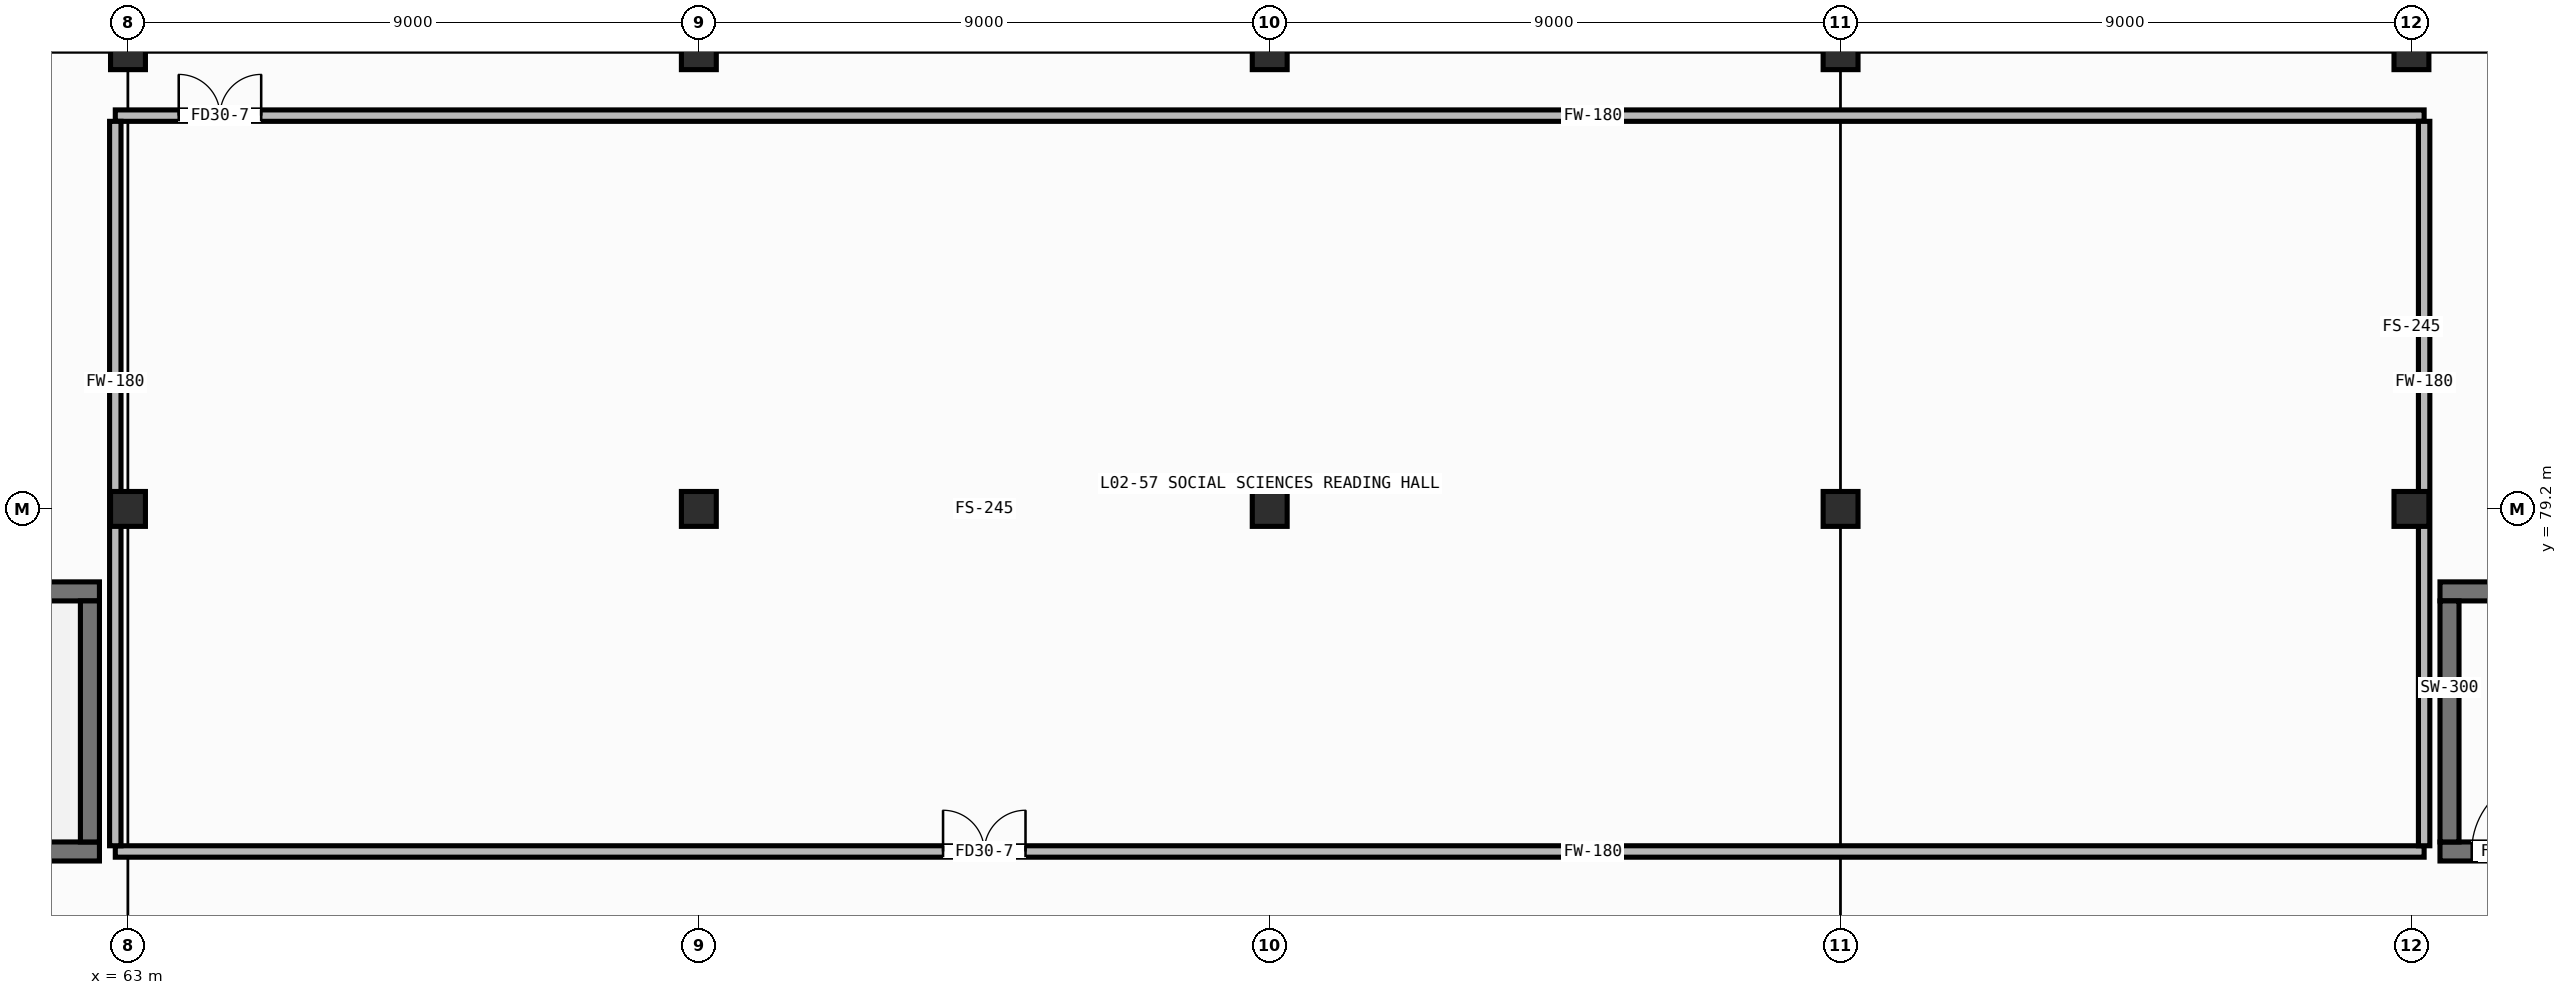
"""IFC4 building model, lengths in metres.
Left out: names, types, materials, properties, quantities, classifications, styles, units other than length and angle.
Written with IfcOpenShell. Run it as: python <this file> out.ifc"""

import sys

from ifc_helpers import new_model, si_unit, direction, frame, frame_2d, origin, origin_2d, place, context, subcontext, project, spatial, rectangle, hollow_rectangle, extrude, element, fill, save


model = new_model("IFC4")
c1 = context("Model", 3, precision=1e-05, world=origin(), true_north=direction((0.0, 1.0)))
c2 = subcontext(c1, "Body", "Model", "MODEL_VIEW")
j1 = project(units=[si_unit("LENGTHUNIT", "METRE"), si_unit("PLANEANGLEUNIT", "RADIAN")], contexts=[c1])
p1 = place(None, origin())
s1 = spatial("IfcSite", under=j1, at=p1, CompositionType="ELEMENT")
p2 = place(p1, origin())
s2 = spatial("IfcBuilding", under=s1, at=p2, CompositionType="ELEMENT")
p3 = place(p2, frame((0.0, 0.0, 4.8)))
s3 = spatial("IfcBuildingStorey", under=s2, at=p3, CompositionType="ELEMENT", Elevation=4.8)
for number, where, z_axis, x_axis in (
    (1, (63.0, 79.2, 0.0), (0.0, 0.0, 1.0), (1.0, 0.0, 0.0)),
    (2, (63.0, 86.4, 0.0), (0.0, 0.0, 1.0), (1.0, 0.0, 0.0)),
):
    element("IfcColumn", number, at=place(p3, frame(where, z_axis=z_axis, x_axis=x_axis)), inside=s3, PredefinedType="COLUMN", context=c2, shape_type="SweptSolid", body=[
        extrude(hollow_rectangle(XDim=0.55, YDim=0.55, WallThickness=0.022, at=origin_2d()), origin(), (0.0, 0.0, 1.0), 4.0),
    ])
p4 = place(p3, frame((72.0, 79.2, 0.0), z_axis=(0.0, 0.0, 1.0), x_axis=(1.0, 0.0, 0.0)))
e3 = element("IfcColumn", 3, at=p4, inside=s3, PredefinedType="COLUMN", context=c2, shape_type="SweptSolid", body=[
    extrude(hollow_rectangle(XDim=0.55, YDim=0.55, WallThickness=0.022, at=origin_2d()), origin(), (0.0, 0.0, 1.0), 3.755),
])
p5 = place(p3, frame((72.0, 86.4, 0.0), z_axis=(0.0, 0.0, 1.0), x_axis=(1.0, 0.0, 0.0)))
e4 = element("IfcColumn", 4, at=p5, inside=s3, PredefinedType="COLUMN", context=c2, shape_type="SweptSolid", body=[
    extrude(hollow_rectangle(XDim=0.55, YDim=0.55, WallThickness=0.022, at=origin_2d()), origin(), (0.0, 0.0, 1.0), 4.0),
])
p6 = place(p3, frame((81.0, 79.2, 0.0), z_axis=(0.0, 0.0, 1.0), x_axis=(1.0, 0.0, 0.0)))
e5 = element("IfcColumn", 5, at=p6, inside=s3, PredefinedType="COLUMN", context=c2, shape_type="SweptSolid", body=[
    extrude(hollow_rectangle(XDim=0.55, YDim=0.55, WallThickness=0.022, at=origin_2d()), origin(), (0.0, 0.0, 1.0), 3.755),
])
for number, where, z_axis, x_axis in (
    (6, (81.0, 86.4, 0.0), (0.0, 0.0, 1.0), (1.0, 0.0, 0.0)),
    (7, (90.0, 79.2, 0.0), (0.0, 0.0, 1.0), (1.0, 0.0, 0.0)),
    (8, (90.0, 86.4, 0.0), (0.0, 0.0, 1.0), (1.0, 0.0, 0.0)),
    (9, (99.0, 79.2, 0.0), (0.0, 0.0, 1.0), (1.0, 0.0, 0.0)),
    (10, (99.0, 86.4, 0.0), (0.0, 0.0, 1.0), (1.0, 0.0, 0.0)),
):
    element("IfcColumn", number, at=place(p3, frame(where, z_axis=z_axis, x_axis=x_axis)), inside=s3, PredefinedType="COLUMN", context=c2, shape_type="SweptSolid", body=[
        extrude(hollow_rectangle(XDim=0.55, YDim=0.55, WallThickness=0.022, at=origin_2d()), origin(), (0.0, 0.0, 1.0), 4.0),
    ])
p7 = place(p3, frame((54.45, 73.8, 0.0), z_axis=(0.0, 0.0, 1.0), x_axis=(1.0, 0.0, 0.0)))
e11 = element("IfcWall", 11, at=p7, inside=s3, PredefinedType="SHEAR", context=c2, shape_type="SweptSolid", body=[
    extrude(rectangle(XDim=8.1, YDim=0.3, at=frame_2d((4.05, 0.0))), origin(), (0.0, 0.0, 1.0), 3.755),
])
p8 = place(p7, frame((0.5, 0.0, 0.0)))
e12 = element("IfcOpeningElement", 12, at=p8, cuts=e11, PredefinedType="OPENING", context=c2, shape_type="SweptSolid", body=[
    extrude(rectangle(XDim=1.2, YDim=2.1, at=frame_2d((0.6, 1.05))), frame((0.0, 0.162, 0.0), z_axis=(0.0, -1.0, 0.0), x_axis=(1.0, 0.0, 0.0)), (0.0, 0.0, 1.0), 0.324),
])
p9 = place(p3, frame((54.45, 77.9, 0.0), z_axis=(0.0, 0.0, 1.0), x_axis=(1.0, 0.0, 0.0)))
e13 = element("IfcWall", 13, at=p9, inside=s3, PredefinedType="SHEAR", context=c2, shape_type="SweptSolid", body=[
    extrude(rectangle(XDim=8.1, YDim=0.3, at=frame_2d((4.05, 0.0))), origin(), (0.0, 0.0, 1.0), 3.755),
])
p10 = place(p3, frame((62.4, 73.95, 0.0), z_axis=(0.0, 0.0, 1.0), x_axis=(0.0, 1.0, 0.0)))
e14 = element("IfcWall", 14, at=p10, inside=s3, PredefinedType="SHEAR", context=c2, shape_type="SweptSolid", body=[
    extrude(rectangle(XDim=3.8, YDim=0.3, at=frame_2d((1.9, 0.0))), origin(), (0.0, 0.0, 1.0), 3.755),
])
p11 = place(p3, frame((99.45, 73.8, 0.0), z_axis=(0.0, 0.0, 1.0), x_axis=(1.0, 0.0, 0.0)))
e15 = element("IfcWall", 15, at=p11, inside=s3, PredefinedType="SHEAR", context=c2, shape_type="SweptSolid", body=[
    extrude(rectangle(XDim=8.1, YDim=0.3, at=frame_2d((4.05, 0.0))), origin(), (0.0, 0.0, 1.0), 3.755),
])
p12 = place(p11, frame((0.5, 0.0, 0.0)))
e16 = element("IfcOpeningElement", 16, at=p12, cuts=e15, PredefinedType="OPENING", context=c2, shape_type="SweptSolid", body=[
    extrude(rectangle(XDim=1.2, YDim=2.1, at=frame_2d((0.6, 1.05))), frame((0.0, 0.162, 0.0), z_axis=(0.0, -1.0, 0.0), x_axis=(1.0, 0.0, 0.0)), (0.0, 0.0, 1.0), 0.324),
])
p13 = place(p3, frame((99.45, 77.9, 0.0), z_axis=(0.0, 0.0, 1.0), x_axis=(1.0, 0.0, 0.0)))
e17 = element("IfcWall", 17, at=p13, inside=s3, PredefinedType="SHEAR", context=c2, shape_type="SweptSolid", body=[
    extrude(rectangle(XDim=8.1, YDim=0.3, at=frame_2d((4.05, 0.0))), origin(), (0.0, 0.0, 1.0), 3.755),
])
p14 = place(p3, frame((99.6, 73.95, 0.0), z_axis=(0.0, 0.0, 1.0), x_axis=(0.0, 1.0, 0.0)))
e18 = element("IfcWall", 18, at=p14, inside=s3, PredefinedType="SHEAR", context=c2, shape_type="SweptSolid", body=[
    extrude(rectangle(XDim=3.8, YDim=0.3, at=frame_2d((1.9, 0.0))), origin(), (0.0, 0.0, 1.0), 3.755),
])
p15 = place(p3, frame((62.8, 73.8, 0.0), z_axis=(0.0, 0.0, 1.0), x_axis=(1.0, 0.0, 0.0)))
e19 = element("IfcWall", 19, at=p15, inside=s3, PredefinedType="PARTITIONING", context=c2, shape_type="SweptSolid", body=[
    extrude(rectangle(XDim=36.4, YDim=0.18, at=frame_2d((18.2, 0.0))), origin(), (0.0, 0.0, 1.0), 3.755),
])
p16 = place(p15, frame((13.05, 0.0, 0.0)))
e20 = element("IfcOpeningElement", 20, at=p16, cuts=e19, PredefinedType="OPENING", context=c2, shape_type="SweptSolid", body=[
    extrude(rectangle(XDim=1.3, YDim=2.08, at=frame_2d((0.65, 1.04))), frame((0.0, 0.102, 0.0), z_axis=(0.0, -1.0, 0.0), x_axis=(1.0, 0.0, 0.0)), (0.0, 0.0, 1.0), 0.204),
])
p17 = place(p3, frame((62.8, 85.4, 0.0), z_axis=(0.0, 0.0, 1.0), x_axis=(1.0, 0.0, 0.0)))
e21 = element("IfcWall", 21, at=p17, inside=s3, PredefinedType="PARTITIONING", context=c2, shape_type="SweptSolid", body=[
    extrude(rectangle(XDim=36.4, YDim=0.18, at=frame_2d((18.2, 0.0))), origin(), (0.0, 0.0, 1.0), 3.755),
])
p18 = place(p17, frame((1.0, 0.0, 0.0)))
e22 = element("IfcOpeningElement", 22, at=p18, cuts=e21, PredefinedType="OPENING", context=c2, shape_type="SweptSolid", body=[
    extrude(rectangle(XDim=1.3, YDim=2.08, at=frame_2d((0.65, 1.04))), frame((0.0, 0.102, 0.0), z_axis=(0.0, -1.0, 0.0), x_axis=(1.0, 0.0, 0.0)), (0.0, 0.0, 1.0), 0.204),
])
for number, where, z_axis, x_axis in (
    (23, (62.8, 73.89, 0.0), (0.0, 0.0, 1.0), (0.0, 1.0, 0.0)),
    (24, (99.2, 73.89, 0.0), (0.0, 0.0, 1.0), (0.0, 1.0, 0.0)),
):
    element("IfcWall", number, at=place(p3, frame(where, z_axis=z_axis, x_axis=x_axis)), inside=s3, PredefinedType="PARTITIONING", context=c2, shape_type="SweptSolid", body=[
        extrude(rectangle(XDim=11.42, YDim=0.18, at=frame_2d((5.71, 0.0))), origin(), (0.0, 0.0, 1.0), 3.035),
    ])
p19 = place(p12, origin())
e25 = element("IfcDoor", 25, at=p19, inside=s3, OperationType="SINGLE_SWING_RIGHT", PredefinedType="DOOR", context=c2, shape_type="SweptSolid", body=[
    extrude(rectangle(XDim=1.2, YDim=2.1, at=frame_2d((0.6, 1.05))), frame((0.0, 0.025, 0.0), z_axis=(0.0, -1.0, 0.0), x_axis=(1.0, 0.0, 0.0)), (0.0, 0.0, 1.0), 0.05),
])
fill(e16, e25)
p20 = place(p16, origin())
e26 = element("IfcDoor", 26, at=p20, inside=s3, OperationType="DOUBLE_DOOR_SINGLE_SWING", PredefinedType="DOOR", context=c2, shape_type="SweptSolid", body=[
    extrude(rectangle(XDim=1.3, YDim=2.08, at=frame_2d((0.65, 1.04))), frame((0.0, 0.025, 0.0), z_axis=(0.0, -1.0, 0.0), x_axis=(1.0, 0.0, 0.0)), (0.0, 0.0, 1.0), 0.05),
])
fill(e20, e26)
p21 = place(p18, origin())
e27 = element("IfcDoor", 27, at=p21, inside=s3, OperationType="DOUBLE_DOOR_SINGLE_SWING", PredefinedType="DOOR", context=c2, shape_type="SweptSolid", body=[
    extrude(rectangle(XDim=1.3, YDim=2.08, at=frame_2d((0.65, 1.04))), frame((0.0, 0.025, 0.0), z_axis=(0.0, -1.0, 0.0), x_axis=(1.0, 0.0, 0.0)), (0.0, 0.0, 1.0), 0.05),
])
fill(e22, e27)
save(model, sys.argv[1])
